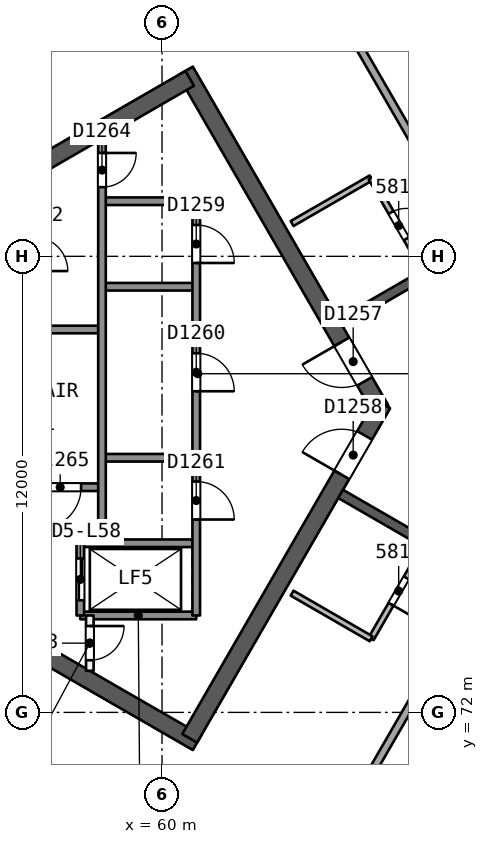
"""IFC4 building model, lengths in metres.
Left out: names, types, materials, properties, quantities, classifications, styles, units other than length and angle.
Written with IfcOpenShell. Run it as: python <this file> out.ifc"""

import sys

from ifc_helpers import new_model, si_unit, direction, frame, frame_2d, origin, place, context, subcontext, project, spatial, rectangle, extrude, element, fill, save


model = new_model("IFC4")
c1 = context("Model", 3, precision=1e-05, world=origin(), true_north=direction((0.0, 1.0)))
c2 = subcontext(c1, "Body", "Model", "MODEL_VIEW")
j1 = project(units=[si_unit("LENGTHUNIT", "METRE"), si_unit("PLANEANGLEUNIT", "RADIAN")], contexts=[c1])
p1 = place(None, origin())
s1 = spatial("IfcSite", under=j1, at=p1, CompositionType="ELEMENT")
p2 = place(p1, origin())
s2 = spatial("IfcBuilding", under=s1, at=p2, CompositionType="ELEMENT")
p3 = place(p2, frame((0.0, 0.0, 235.4)))
s3 = spatial("IfcBuildingStorey", under=s2, at=p3, CompositionType="ELEMENT", Elevation=235.4)
p4 = place(p3, frame((65.74, 80.0, 0.0), z_axis=(0.0, 0.0, 1.0), x_axis=(-0.499991857942, 0.866030104553, 0.0)))
e1 = element("IfcWall", 1, at=p4, inside=s3, PredefinedType="SHEAR", context=c2, shape_type="SweptSolid", body=[
    extrude(rectangle(XDim=10.25, YDim=0.45, at=frame_2d((5.125, 0.0))), origin(), (0.0, 0.0, 1.0), 3.7),
])
p5 = place(p4, frame((0.82, 0.0, 0.0)))
e2 = element("IfcOpeningElement", 2, at=p5, cuts=e1, PredefinedType="OPENING", context=c2, shape_type="SweptSolid", body=[
    extrude(rectangle(XDim=1.2, YDim=2.1, at=frame_2d((0.6, 1.05))), frame((0.0, 0.235, 0.0), z_axis=(0.0, -1.0, 0.0), x_axis=(1.0, 0.0, 0.0)), (0.0, 0.0, 1.0), 0.471),
])
p6 = place(p3, frame((60.728, 88.682, 0.0), z_axis=(0.0, 0.0, 1.0), x_axis=(-0.866021613849, -0.500006564303, 0.0)))
e3 = element("IfcWall", 3, at=p6, inside=s3, PredefinedType="SHEAR", context=c2, shape_type="SweptSolid", body=[
    extrude(rectangle(XDim=14.108, YDim=0.45, at=frame_2d((7.054, 0.0))), origin(), (0.0, 0.0, 1.0), 3.7),
])
p7 = place(p3, frame((48.622, 78.307, 0.0), z_axis=(0.0, 0.0, 1.0), x_axis=(0.86602701116, -0.499997215934, 0.0)))
e4 = element("IfcWall", 4, at=p7, inside=s3, PredefinedType="SHEAR", context=c2, shape_type="SweptSolid", body=[
    extrude(rectangle(XDim=14.204, YDim=0.45, at=frame_2d((7.102, 0.0))), origin(), (0.0, 0.0, 1.0), 3.7),
])
p8 = place(p3, frame((60.728, 71.318, 0.0), z_axis=(0.0, 0.0, 1.0), x_axis=(0.500012416173, 0.866018235185, 0.0)))
e5 = element("IfcWall", 5, at=p8, inside=s3, PredefinedType="SHEAR", context=c2, shape_type="SweptSolid", body=[
    extrude(rectangle(XDim=10.155, YDim=0.45, at=frame_2d((5.078, 0.0))), origin(), (0.0, 0.0, 1.0), 3.7),
])
p9 = place(p8, frame((8.005, 0.0, 0.0)))
e6 = element("IfcOpeningElement", 6, at=p9, cuts=e5, PredefinedType="OPENING", context=c2, shape_type="SweptSolid", body=[
    extrude(rectangle(XDim=1.2, YDim=2.1, at=frame_2d((0.6, 1.05))), frame((0.0, 0.235, 0.0), z_axis=(0.0, -1.0, 0.0), x_axis=(1.0, 0.0, 0.0)), (0.0, 0.0, 1.0), 0.471),
])
p10 = place(p3, frame((78.2, 90.046, 0.0), z_axis=(0.0, 0.0, 1.0), x_axis=(-0.866026492143, -0.499998114903, 0.0)))
e7 = element("IfcWall", 7, at=p10, inside=s3, PredefinedType="SHEAR", context=c2, shape_type="SweptSolid", body=[
    extrude(rectangle(XDim=15.588, YDim=0.25, at=frame_2d((7.794, 0.0))), origin(), (0.0, 0.0, 1.0), 3.3),
])
p11 = place(p10, frame((3.294, 0.0, 0.0)))
e8 = element("IfcOpeningElement", 8, at=p11, cuts=e7, PredefinedType="OPENING", context=c2, shape_type="SweptSolid", body=[
    extrude(rectangle(XDim=1.0, YDim=2.1, at=frame_2d((0.5, 1.05))), frame((0.0, 0.135, 0.0), z_axis=(0.0, -1.0, 0.0), x_axis=(1.0, 0.0, 0.0)), (0.0, 0.0, 1.0), 0.271),
])
p12 = place(p10, frame((9.162, 0.0, 0.0)))
e9 = element("IfcOpeningElement", 9, at=p12, cuts=e7, PredefinedType="OPENING", context=c2, shape_type="SweptSolid", body=[
    extrude(rectangle(XDim=1.1, YDim=2.1, at=frame_2d((0.55, 1.05))), frame((0.0, 0.135, 0.0), z_axis=(0.0, -1.0, 0.0), x_axis=(1.0, 0.0, 0.0)), (0.0, 0.0, 1.0), 0.271),
])
p13 = place(p10, frame((11.762, 0.0, 0.0)))
e10 = element("IfcOpeningElement", 10, at=p13, cuts=e7, PredefinedType="OPENING", context=c2, shape_type="SweptSolid", body=[
    extrude(rectangle(XDim=1.0, YDim=2.1, at=frame_2d((0.5, 1.05))), frame((0.0, 0.135, 0.0), z_axis=(0.0, -1.0, 0.0), x_axis=(1.0, 0.0, 0.0)), (0.0, 0.0, 1.0), 0.271),
])
p14 = place(p3, frame((64.7, 77.748, 0.0), z_axis=(0.0, 0.0, 1.0), x_axis=(0.866026492143, -0.499998114903, 0.0)))
e11 = element("IfcWall", 11, at=p14, inside=s3, PredefinedType="SHEAR", context=c2, shape_type="SweptSolid", body=[
    extrude(rectangle(XDim=15.588, YDim=0.25, at=frame_2d((7.794, 0.0))), origin(), (0.0, 0.0, 1.0), 3.3),
])
p15 = place(p14, frame((2.982, 0.0, 0.0)))
e12 = element("IfcOpeningElement", 12, at=p15, cuts=e11, PredefinedType="OPENING", context=c2, shape_type="SweptSolid", body=[
    extrude(rectangle(XDim=1.0, YDim=2.1, at=frame_2d((0.5, 1.05))), frame((0.0, 0.135, 0.0), z_axis=(0.0, -1.0, 0.0), x_axis=(1.0, 0.0, 0.0)), (0.0, 0.0, 1.0), 0.271),
])
p16 = place(p14, frame((8.538, 0.0, 0.0)))
e13 = element("IfcOpeningElement", 13, at=p16, cuts=e11, PredefinedType="OPENING", context=c2, shape_type="SweptSolid", body=[
    extrude(rectangle(XDim=1.1, YDim=2.1, at=frame_2d((0.55, 1.05))), frame((0.0, 0.135, 0.0), z_axis=(0.0, -1.0, 0.0), x_axis=(1.0, 0.0, 0.0)), (0.0, 0.0, 1.0), 0.271),
])
p17 = place(p14, frame((11.45, 0.0, 0.0)))
e14 = element("IfcOpeningElement", 14, at=p17, cuts=e11, PredefinedType="OPENING", context=c2, shape_type="SweptSolid", body=[
    extrude(rectangle(XDim=1.0, YDim=2.1, at=frame_2d((0.5, 1.05))), frame((0.0, 0.135, 0.0), z_axis=(0.0, -1.0, 0.0), x_axis=(1.0, 0.0, 0.0)), (0.0, 0.0, 1.0), 0.271),
])
p18 = place(p3, frame((63.158, 93.029, 0.0), z_axis=(0.0, 0.0, 1.0), x_axis=(0.499992962407, -0.866029466902, 0.0)))
e15 = element("IfcWall", 15, at=p18, inside=s3, PredefinedType="PARTITIONING", context=c2, shape_type="SweptSolid", body=[
    extrude(rectangle(XDim=10.104, YDim=0.2, at=frame_2d((5.052, 0.0))), origin(), (0.0, 0.0, 1.0), 3.3),
])
p19 = place(p3, frame((63.422, 84.863, 0.0), z_axis=(0.0, 0.0, 1.0), x_axis=(0.865994240961, 0.500053971709, 0.0)))
e16 = element("IfcWall", 16, at=p19, inside=s3, PredefinedType="PARTITIONING", context=c2, shape_type="SweptSolid", body=[
    extrude(rectangle(XDim=2.401, YDim=0.15, at=frame_2d((1.201, 0.0))), origin(), (0.0, 0.0, 1.0), 3.3),
])
p20 = place(p3, frame((65.502, 86.063, 0.0), z_axis=(0.0, 0.0, 1.0), x_axis=(0.499987231761, -0.866032775405, 0.0)))
e17 = element("IfcWall", 17, at=p20, inside=s3, PredefinedType="PARTITIONING", context=c2, shape_type="SweptSolid", body=[
    extrude(rectangle(XDim=2.9, YDim=0.15, at=frame_2d((1.45, 0.0))), origin(), (0.0, 0.0, 1.0), 3.3),
])
p21 = place(p20, frame((1.05, 0.0, 0.0)))
e18 = element("IfcOpeningElement", 18, at=p21, cuts=e17, PredefinedType="OPENING", context=c2, shape_type="SweptSolid", body=[
    extrude(rectangle(XDim=0.8, YDim=2.1, at=frame_2d((0.4, 1.05))), frame((0.0, 0.085, 0.0), z_axis=(0.0, -1.0, 0.0), x_axis=(1.0, 0.0, 0.0)), (0.0, 0.0, 1.0), 0.171),
])
p22 = place(p3, frame((66.952, 76.448, 0.0), z_axis=(0.0, 0.0, 1.0), x_axis=(-0.499987231761, -0.866032775405, 0.0)))
e19 = element("IfcWall", 19, at=p22, inside=s3, PredefinedType="PARTITIONING", context=c2, shape_type="SweptSolid", body=[
    extrude(rectangle(XDim=2.9, YDim=0.15, at=frame_2d((1.45, 0.0))), origin(), (0.0, 0.0, 1.0), 3.3),
])
p23 = place(p22, frame((1.05, 0.0, 0.0)))
e20 = element("IfcOpeningElement", 20, at=p23, cuts=e19, PredefinedType="OPENING", context=c2, shape_type="SweptSolid", body=[
    extrude(rectangle(XDim=0.8, YDim=2.1, at=frame_2d((0.4, 1.05))), frame((0.0, 0.085, 0.0), z_axis=(0.0, -1.0, 0.0), x_axis=(1.0, 0.0, 0.0)), (0.0, 0.0, 1.0), 0.171),
])
p24 = place(p3, frame((65.502, 73.937, 0.0), z_axis=(0.0, 0.0, 1.0), x_axis=(-0.865994240961, 0.500053971709, 0.0)))
e21 = element("IfcWall", 21, at=p24, inside=s3, PredefinedType="PARTITIONING", context=c2, shape_type="SweptSolid", body=[
    extrude(rectangle(XDim=2.401, YDim=0.15, at=frame_2d((1.201, 0.0))), origin(), (0.0, 0.0, 1.0), 3.3),
])
p25 = place(p3, frame((63.428, 66.815, 0.0), z_axis=(0.0, 0.0, 1.0), x_axis=(0.499994154718, 0.866028778533, 0.0)))
e22 = element("IfcWall", 22, at=p25, inside=s3, PredefinedType="PARTITIONING", context=c2, shape_type="SweptSolid", body=[
    extrude(rectangle(XDim=7.104, YDim=0.2, at=frame_2d((3.552, 0.0))), origin(), (0.0, 0.0, 1.0), 3.3),
])
p26 = place(p3, frame((44.715, 82.552, 0.0), z_axis=(0.0, 0.0, 1.0), x_axis=(0.866025334516, 0.500000119977, 0.0)))
e23 = element("IfcWall", 23, at=p26, inside=s3, PredefinedType="SOLIDWALL", context=c2, shape_type="SweptSolid", body=[
    extrude(rectangle(XDim=49.903, YDim=0.3, at=frame_2d((24.952, 0.0))), origin(), (0.0, 0.0, 1.0), 3.3),
])
p27 = place(p26, frame((23.284, 0.0, 0.0)))
e24 = element("IfcOpeningElement", 24, at=p27, cuts=e23, PredefinedType="OPENING", context=c2, shape_type="SweptSolid", body=[
    extrude(rectangle(XDim=2.4, YDim=2.4, at=frame_2d((1.2, 1.2))), frame((0.0, 0.161, 0.0), z_axis=(0.0, -1.0, 0.0), x_axis=(1.0, 0.0, 0.0)), (0.0, 0.0, 1.0), 0.321),
])
p28 = place(p26, frame((37.674, 0.0, 0.0)))
e25 = element("IfcOpeningElement", 25, at=p28, cuts=e23, PredefinedType="OPENING", context=c2, shape_type="SweptSolid", body=[
    extrude(rectangle(XDim=2.4, YDim=2.4, at=frame_2d((1.2, 1.2))), frame((0.0, 0.161, 0.0), z_axis=(0.0, -1.0, 0.0), x_axis=(1.0, 0.0, 0.0)), (0.0, 0.0, 1.0), 0.321),
])
p29 = place(p26, frame((9.362, 0.0, 0.0)))
e26 = element("IfcOpeningElement", 26, at=p29, cuts=e23, PredefinedType="OPENING", context=c2, shape_type="SweptSolid", body=[
    extrude(rectangle(XDim=2.4, YDim=2.4, at=frame_2d((1.2, 1.2))), frame((0.0, 0.161, 0.0), z_axis=(0.0, -1.0, 0.0), x_axis=(1.0, 0.0, 0.0)), (0.0, 0.0, 1.0), 0.321),
])
p30 = place(p3, frame((87.932, 52.496, 0.0), z_axis=(0.0, 0.0, 1.0), x_axis=(-0.866025334516, 0.500000119977, 0.0)))
e27 = element("IfcWall", 27, at=p30, inside=s3, PredefinedType="SOLIDWALL", context=c2, shape_type="SweptSolid", body=[
    extrude(rectangle(XDim=49.903, YDim=0.3, at=frame_2d((24.952, 0.0))), origin(), (0.0, 0.0, 1.0), 3.3),
])
p31 = place(p30, frame((23.907, 0.0, 0.0)))
e28 = element("IfcOpeningElement", 28, at=p31, cuts=e27, PredefinedType="OPENING", context=c2, shape_type="SweptSolid", body=[
    extrude(rectangle(XDim=2.4, YDim=2.4, at=frame_2d((1.2, 1.2))), frame((0.0, 0.161, 0.0), z_axis=(0.0, -1.0, 0.0), x_axis=(1.0, 0.0, 0.0)), (0.0, 0.0, 1.0), 0.321),
])
p32 = place(p30, frame((37.985, 0.0, 0.0)))
e29 = element("IfcOpeningElement", 29, at=p32, cuts=e27, PredefinedType="OPENING", context=c2, shape_type="SweptSolid", body=[
    extrude(rectangle(XDim=2.4, YDim=2.4, at=frame_2d((1.2, 1.2))), frame((0.0, 0.161, 0.0), z_axis=(0.0, -1.0, 0.0), x_axis=(1.0, 0.0, 0.0)), (0.0, 0.0, 1.0), 0.321),
])
p33 = place(p30, frame((9.674, 0.0, 0.0)))
e30 = element("IfcOpeningElement", 30, at=p33, cuts=e27, PredefinedType="OPENING", context=c2, shape_type="SweptSolid", body=[
    extrude(rectangle(XDim=2.4, YDim=2.4, at=frame_2d((1.2, 1.2))), frame((0.0, 0.161, 0.0), z_axis=(0.0, -1.0, 0.0), x_axis=(1.0, 0.0, 0.0)), (0.0, 0.0, 1.0), 0.321),
])
for number, where, z_axis, x_axis in (
    (31, (60.9, 85.45, 0.0), (0.0, 0.0, 1.0), (-1.0, 0.0, 0.0)),
    (32, (60.9, 83.2, 0.0), (0.0, 0.0, 1.0), (-1.0, 0.0, 0.0)),
):
    element("IfcWall", number, at=place(p3, frame(where, z_axis=z_axis, x_axis=x_axis)), inside=s3, PredefinedType="SOLIDWALL", context=c2, shape_type="SweptSolid", body=[
        extrude(rectangle(XDim=2.48, YDim=0.2, at=frame_2d((1.24, 0.0))), origin(), (0.0, 0.0, 1.0), 3.3),
    ])
p34 = place(p3, frame((58.42, 82.075, 0.0), z_axis=(0.0, 0.0, 1.0), x_axis=(-1.0, 0.0, 0.0)))
e33 = element("IfcWall", 33, at=p34, inside=s3, PredefinedType="SOLIDWALL", context=c2, shape_type="SweptSolid", body=[
    extrude(rectangle(XDim=7.7, YDim=0.2, at=frame_2d((3.85, 0.0))), origin(), (0.0, 0.0, 1.0), 3.3),
])
p35 = place(p3, frame((60.9, 78.7, 0.0), z_axis=(0.0, 0.0, 1.0), x_axis=(-1.0, 0.0, 0.0)))
e34 = element("IfcWall", 34, at=p35, inside=s3, PredefinedType="SOLIDWALL", context=c2, shape_type="SweptSolid", body=[
    extrude(rectangle(XDim=2.48, YDim=0.2, at=frame_2d((1.24, 0.0))), origin(), (0.0, 0.0, 1.0), 3.3),
])
p36 = place(p3, frame((58.42, 77.925, 0.0), z_axis=(0.0, 0.0, 1.0), x_axis=(-1.0, 0.0, 0.0)))
e35 = element("IfcWall", 35, at=p36, inside=s3, PredefinedType="SOLIDWALL", context=c2, shape_type="SweptSolid", body=[
    extrude(rectangle(XDim=7.7, YDim=0.2, at=frame_2d((3.85, 0.0))), origin(), (0.0, 0.0, 1.0), 3.3),
])
p37 = place(p36, frame((0.55, 0.0, 0.0)))
e36 = element("IfcOpeningElement", 36, at=p37, cuts=e35, PredefinedType="OPENING", context=c2, shape_type="SweptSolid", body=[
    extrude(rectangle(XDim=1.1, YDim=2.1, at=frame_2d((0.55, 1.05))), frame((0.0, 0.11, 0.0), z_axis=(0.0, -1.0, 0.0), x_axis=(1.0, 0.0, 0.0)), (0.0, 0.0, 1.0), 0.221),
])
for number, where, z_axis, x_axis in (
    (37, (60.9, 76.45, 0.0), (0.0, 0.0, 1.0), (-1.0, 0.0, 0.0)),
    (38, (60.9, 74.55, 0.0), (0.0, 0.0, 1.0), (-1.0, 0.0, 0.0)),
):
    element("IfcWall", number, at=place(p3, frame(where, z_axis=z_axis, x_axis=x_axis)), inside=s3, PredefinedType="SOLIDWALL", context=c2, shape_type="SweptSolid", body=[
        extrude(rectangle(XDim=3.05, YDim=0.2, at=frame_2d((1.525, 0.0))), origin(), (0.0, 0.0, 1.0), 3.3),
    ])
p38 = place(p3, frame((60.9, 85.45, 0.0), z_axis=(0.0, 0.0, 1.0), x_axis=(0.0, -1.0, 0.0)))
e39 = element("IfcWall", 39, at=p38, inside=s3, PredefinedType="SOLIDWALL", context=c2, shape_type="SweptSolid", body=[
    extrude(rectangle(XDim=10.9, YDim=0.2, at=frame_2d((5.45, 0.0))), origin(), (0.0, 0.0, 1.0), 3.3),
])
p39 = place(p38, frame((0.625, 0.0, 0.0)))
e40 = element("IfcOpeningElement", 40, at=p39, cuts=e39, PredefinedType="OPENING", context=c2, shape_type="SweptSolid", body=[
    extrude(rectangle(XDim=1.0, YDim=2.1, at=frame_2d((0.5, 1.05))), frame((0.0, 0.11, 0.0), z_axis=(0.0, -1.0, 0.0), x_axis=(1.0, 0.0, 0.0)), (0.0, 0.0, 1.0), 0.221),
])
p40 = place(p38, frame((4.0, 0.0, 0.0)))
e41 = element("IfcOpeningElement", 41, at=p40, cuts=e39, PredefinedType="OPENING", context=c2, shape_type="SweptSolid", body=[
    extrude(rectangle(XDim=1.0, YDim=2.1, at=frame_2d((0.5, 1.05))), frame((0.0, 0.11, 0.0), z_axis=(0.0, -1.0, 0.0), x_axis=(1.0, 0.0, 0.0)), (0.0, 0.0, 1.0), 0.221),
])
p41 = place(p38, frame((7.375, 0.0, 0.0)))
e42 = element("IfcOpeningElement", 42, at=p41, cuts=e39, PredefinedType="OPENING", context=c2, shape_type="SweptSolid", body=[
    extrude(rectangle(XDim=1.0, YDim=2.1, at=frame_2d((0.5, 1.05))), frame((0.0, 0.11, 0.0), z_axis=(0.0, -1.0, 0.0), x_axis=(1.0, 0.0, 0.0)), (0.0, 0.0, 1.0), 0.221),
])
p42 = place(p3, frame((58.42, 87.09, 0.0), z_axis=(0.0, 0.0, 1.0), x_axis=(0.0, -1.0, 0.0)))
e43 = element("IfcWall", 43, at=p42, inside=s3, PredefinedType="SOLIDWALL", context=c2, shape_type="SweptSolid", body=[
    extrude(rectangle(XDim=10.64, YDim=0.2, at=frame_2d((5.32, 0.0))), origin(), (0.0, 0.0, 1.0), 3.3),
])
p43 = place(p42, frame((0.37, 0.0, 0.0)))
e44 = element("IfcOpeningElement", 44, at=p43, cuts=e43, PredefinedType="OPENING", context=c2, shape_type="SweptSolid", body=[
    extrude(rectangle(XDim=0.9, YDim=2.1, at=frame_2d((0.45, 1.05))), frame((0.0, 0.11, 0.0), z_axis=(0.0, -1.0, 0.0), x_axis=(1.0, 0.0, 0.0)), (0.0, 0.0, 1.0), 0.221),
])
p44 = place(p3, frame((58.1, 74.55, 0.0), z_axis=(0.0, 0.0, 1.0), x_axis=(0.0, -1.0, 0.0)))
e45 = element("IfcWall", 45, at=p44, inside=s3, PredefinedType="PARTITIONING", context=c2, shape_type="SweptSolid", body=[
    extrude(rectangle(XDim=1.455, YDim=0.2, at=frame_2d((0.728, 0.0))), origin(), (0.0, 0.0, 1.0), 3.3),
])
p45 = place(p44, frame((0.278, 0.0, 0.0)))
e46 = element("IfcOpeningElement", 46, at=p45, cuts=e45, PredefinedType="OPENING", context=c2, shape_type="SweptSolid", body=[
    extrude(rectangle(XDim=0.9, YDim=2.1, at=frame_2d((0.45, 1.05))), frame((0.0, 0.11, 0.0), z_axis=(0.0, -1.0, 0.0), x_axis=(1.0, 0.0, 0.0)), (0.0, 0.0, 1.0), 0.221),
])
p46 = place(p3, frame((57.85, 76.45, 0.0), z_axis=(0.0, 0.0, 1.0), x_axis=(0.0, -1.0, 0.0)))
e47 = element("IfcWall", 47, at=p46, inside=s3, PredefinedType="SOLIDWALL", context=c2, shape_type="SweptSolid", body=[
    extrude(rectangle(XDim=1.9, YDim=0.2, at=frame_2d((0.95, 0.0))), origin(), (0.0, 0.0, 1.0), 3.3),
])
p47 = place(p46, frame((0.4, 0.0, 0.0)))
e48 = element("IfcOpeningElement", 48, at=p47, cuts=e47, PredefinedType="OPENING", context=c2, shape_type="SweptSolid", body=[
    extrude(rectangle(XDim=1.1, YDim=2.1, at=frame_2d((0.55, 1.05))), frame((0.0, 0.11, 0.0), z_axis=(0.0, -1.0, 0.0), x_axis=(1.0, 0.0, 0.0)), (0.0, 0.0, 1.0), 0.221),
])
p48 = place(p21, origin())
e49 = element("IfcDoor", 49, at=p48, inside=s3, OperationType="SINGLE_SWING_RIGHT", PredefinedType="NOTDEFINED", context=c2, shape_type="SweptSolid", body=[
    extrude(rectangle(XDim=0.8, YDim=2.1, at=frame_2d((0.4, 1.05))), frame((0.0, 0.025, 0.0), z_axis=(0.0, -1.0, 0.0), x_axis=(1.0, 0.0, 0.0)), (0.0, 0.0, 1.0), 0.05),
])
fill(e18, e49)
p49 = place(p23, origin())
e50 = element("IfcDoor", 50, at=p49, inside=s3, OperationType="SINGLE_SWING_RIGHT", PredefinedType="NOTDEFINED", context=c2, shape_type="SweptSolid", body=[
    extrude(rectangle(XDim=0.8, YDim=2.1, at=frame_2d((0.4, 1.05))), frame((0.0, 0.025, 0.0), z_axis=(0.0, -1.0, 0.0), x_axis=(1.0, 0.0, 0.0)), (0.0, 0.0, 1.0), 0.05),
])
fill(e20, e50)
p50 = place(p5, origin())
e51 = element("IfcDoor", 51, at=p50, inside=s3, OperationType="SINGLE_SWING_RIGHT", PredefinedType="NOTDEFINED", context=c2, shape_type="SweptSolid", body=[
    extrude(rectangle(XDim=1.2, YDim=2.1, at=frame_2d((0.6, 1.05))), frame((0.0, 0.025, 0.0), z_axis=(0.0, -1.0, 0.0), x_axis=(1.0, 0.0, 0.0)), (0.0, 0.0, 1.0), 0.05),
])
fill(e2, e51)
p51 = place(p9, origin())
e52 = element("IfcDoor", 52, at=p51, inside=s3, OperationType="SINGLE_SWING_LEFT", PredefinedType="NOTDEFINED", context=c2, shape_type="SweptSolid", body=[
    extrude(rectangle(XDim=1.2, YDim=2.1, at=frame_2d((0.6, 1.05))), frame((0.0, 0.025, 0.0), z_axis=(0.0, -1.0, 0.0), x_axis=(1.0, 0.0, 0.0)), (0.0, 0.0, 1.0), 0.05),
])
fill(e6, e52)
p52 = place(p47, origin())
e53 = element("IfcDoor", 53, at=p52, inside=s3, OperationType="SLIDING_TO_RIGHT", PredefinedType="NOTDEFINED", context=c2, shape_type="SweptSolid", body=[
    extrude(rectangle(XDim=1.1, YDim=2.1, at=frame_2d((0.55, 1.05))), frame((0.0, 0.025, 0.0), z_axis=(0.0, -1.0, 0.0), x_axis=(1.0, 0.0, 0.0)), (0.0, 0.0, 1.0), 0.05),
])
fill(e48, e53)
p53 = place(p39, origin())
e54 = element("IfcDoor", 54, at=p53, inside=s3, OperationType="SINGLE_SWING_RIGHT", PredefinedType="NOTDEFINED", context=c2, shape_type="SweptSolid", body=[
    extrude(rectangle(XDim=1.0, YDim=2.1, at=frame_2d((0.5, 1.05))), frame((0.0, 0.025, 0.0), z_axis=(0.0, -1.0, 0.0), x_axis=(1.0, 0.0, 0.0)), (0.0, 0.0, 1.0), 0.05),
])
fill(e40, e54)
p54 = place(p40, origin())
e55 = element("IfcDoor", 55, at=p54, inside=s3, OperationType="SINGLE_SWING_RIGHT", PredefinedType="NOTDEFINED", context=c2, shape_type="SweptSolid", body=[
    extrude(rectangle(XDim=1.0, YDim=2.1, at=frame_2d((0.5, 1.05))), frame((0.0, 0.025, 0.0), z_axis=(0.0, -1.0, 0.0), x_axis=(1.0, 0.0, 0.0)), (0.0, 0.0, 1.0), 0.05),
])
fill(e41, e55)
p55 = place(p41, origin())
e56 = element("IfcDoor", 56, at=p55, inside=s3, OperationType="SINGLE_SWING_RIGHT", PredefinedType="NOTDEFINED", context=c2, shape_type="SweptSolid", body=[
    extrude(rectangle(XDim=1.0, YDim=2.1, at=frame_2d((0.5, 1.05))), frame((0.0, 0.025, 0.0), z_axis=(0.0, -1.0, 0.0), x_axis=(1.0, 0.0, 0.0)), (0.0, 0.0, 1.0), 0.05),
])
fill(e42, e56)
p56 = place(p45, origin())
e57 = element("IfcDoor", 57, at=p56, inside=s3, OperationType="SINGLE_SWING_LEFT", PredefinedType="NOTDEFINED", context=c2, shape_type="SweptSolid", body=[
    extrude(rectangle(XDim=0.9, YDim=2.1, at=frame_2d((0.45, 1.05))), frame((0.0, 0.025, 0.0), z_axis=(0.0, -1.0, 0.0), x_axis=(1.0, 0.0, 0.0)), (0.0, 0.0, 1.0), 0.05),
])
fill(e46, e57)
p57 = place(p43, origin())
e58 = element("IfcDoor", 58, at=p57, inside=s3, OperationType="SINGLE_SWING_LEFT", PredefinedType="NOTDEFINED", context=c2, shape_type="SweptSolid", body=[
    extrude(rectangle(XDim=0.9, YDim=2.1, at=frame_2d((0.45, 1.05))), frame((0.0, 0.025, 0.0), z_axis=(0.0, -1.0, 0.0), x_axis=(1.0, 0.0, 0.0)), (0.0, 0.0, 1.0), 0.05),
])
fill(e44, e58)
p58 = place(p37, origin())
e59 = element("IfcDoor", 59, at=p58, inside=s3, OperationType="SINGLE_SWING_RIGHT", PredefinedType="NOTDEFINED", context=c2, shape_type="SweptSolid", body=[
    extrude(rectangle(XDim=1.1, YDim=2.1, at=frame_2d((0.55, 1.05))), frame((0.0, 0.025, 0.0), z_axis=(0.0, -1.0, 0.0), x_axis=(1.0, 0.0, 0.0)), (0.0, 0.0, 1.0), 0.05),
])
fill(e36, e59)
save(model, sys.argv[1])
